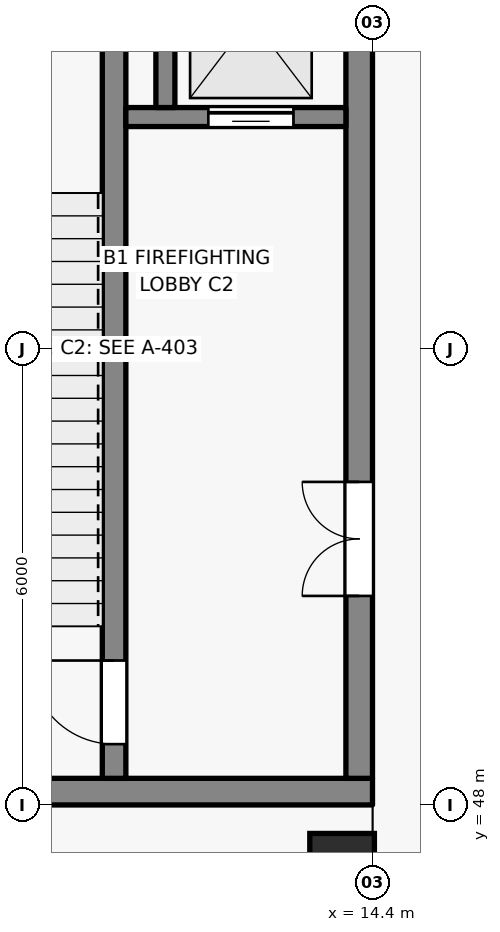
"""IFC4 building model, lengths in metres.
Left out: names, types, materials, properties, quantities, classifications, styles, units other than length and angle.
Written with IfcOpenShell. Run it as: python <this file> out.ifc"""

import sys

from ifc_helpers import new_model, si_unit, direction, frame, frame_2d, origin, origin_2d, place, context, subcontext, project, spatial, rectangle, extrude, element, fill, save


model = new_model("IFC4")
c1 = context("Model", 3, precision=1e-05, world=origin(), true_north=direction((0.0, 1.0)))
c2 = subcontext(c1, "Body", "Model", "MODEL_VIEW")
j1 = project(units=[si_unit("LENGTHUNIT", "METRE"), si_unit("PLANEANGLEUNIT", "RADIAN")], contexts=[c1])
p1 = place(None, origin())
s1 = spatial("IfcSite", under=j1, at=p1, CompositionType="ELEMENT")
p2 = place(p1, origin())
s2 = spatial("IfcBuilding", under=s1, at=p2, CompositionType="ELEMENT")
p3 = place(p2, frame((0.0, 0.0, -7.2)))
s3 = spatial("IfcBuildingStorey", under=s2, at=p3, CompositionType="ELEMENT", Elevation=-7.2)
p4 = place(p3, frame((7.2, 48.175, 0.0), z_axis=(0.0, 0.0, 1.0), x_axis=(1.0, 0.0, 0.0)))
e1 = element("IfcWall", 1, at=p4, inside=s3, PredefinedType="SHEAR", context=c2, shape_type="SweptSolid", body=[
    extrude(rectangle(XDim=7.2, YDim=0.35, at=frame_2d((3.6, 0.0))), origin(), (0.0, 0.0, 1.0), 6.8),
])
p5 = place(p3, frame((14.225, 48.35, 0.0), z_axis=(0.0, 0.0, 1.0), x_axis=(0.0, 1.0, 0.0)))
e2 = element("IfcWall", 2, at=p5, inside=s3, PredefinedType="SHEAR", context=c2, shape_type="SweptSolid", body=[
    extrude(rectangle(XDim=11.3, YDim=0.35, at=frame_2d((5.65, 0.0))), origin(), (0.0, 0.0, 1.0), 6.8),
])
p6 = place(p5, frame((2.4, 0.0, 0.0)))
e3 = element("IfcOpeningElement", 3, at=p6, cuts=e2, PredefinedType="OPENING", context=c2, shape_type="SweptSolid", body=[
    extrude(rectangle(XDim=1.5, YDim=2.15, at=frame_2d((0.75, 1.075))), frame((0.0, 0.185, 0.0), z_axis=(0.0, -1.0, 0.0), x_axis=(1.0, 0.0, 0.0)), (0.0, 0.0, 1.0), 0.37),
])
p7 = place(p3, frame((11.0, 48.35, 0.0), z_axis=(0.0, 0.0, 1.0), x_axis=(0.0, 1.0, 0.0)))
e4 = element("IfcWall", 4, at=p7, inside=s3, PredefinedType="SHEAR", context=c2, shape_type="SweptSolid", body=[
    extrude(rectangle(XDim=11.3, YDim=0.31, at=frame_2d((5.65, 0.0))), origin(), (0.0, 0.0, 1.0), 6.8),
])
p8 = place(p7, frame((0.45, 0.0, 0.0)))
e5 = element("IfcOpeningElement", 5, at=p8, cuts=e4, PredefinedType="OPENING", context=c2, shape_type="SweptSolid", body=[
    extrude(rectangle(XDim=1.1, YDim=2.15, at=frame_2d((0.55, 1.075))), frame((0.0, 0.165, 0.0), z_axis=(0.0, -1.0, 0.0), x_axis=(1.0, 0.0, 0.0)), (0.0, 0.0, 1.0), 0.33),
])
p9 = place(p3, frame((14.0, 47.2, 0.0), z_axis=(0.0, 0.0, 1.0), x_axis=(1.0, 0.0, 0.0)))
e6 = element("IfcColumn", 6, at=p9, inside=s3, PredefinedType="COLUMN", context=c2, shape_type="SweptSolid", body=[
    extrude(rectangle(XDim=0.85, YDim=0.85, at=origin_2d()), origin(), (0.0, 0.0, 1.0), 7.2),
])
p10 = place(p3, frame((11.155, 57.05, 0.0), z_axis=(0.0, 0.0, 1.0), x_axis=(1.0, 0.0, 0.0)))
e7 = element("IfcWall", 7, at=p10, inside=s3, PredefinedType="SHEAR", context=c2, shape_type="SweptSolid", body=[
    extrude(rectangle(XDim=2.895, YDim=0.25, at=frame_2d((1.448, 0.0))), origin(), (0.0, 0.0, 1.0), 6.8),
])
p11 = place(p10, frame((1.085, 0.0, 0.0)))
e8 = element("IfcOpeningElement", 8, at=p11, cuts=e7, PredefinedType="OPENING", context=c2, shape_type="SweptSolid", body=[
    extrude(rectangle(XDim=1.12, YDim=2.15, at=frame_2d((0.56, 1.075))), frame((0.0, 0.135, 0.0), z_axis=(0.0, -1.0, 0.0), x_axis=(1.0, 0.0, 0.0)), (0.0, 0.0, 1.0), 0.27),
])
p12 = place(p3, frame((11.675, 57.175, 0.0), z_axis=(0.0, 0.0, 1.0), x_axis=(0.0, 1.0, 0.0)))
e9 = element("IfcWall", 9, at=p12, inside=s3, PredefinedType="SHEAR", context=c2, shape_type="SweptSolid", body=[
    extrude(rectangle(XDim=2.475, YDim=0.25, at=frame_2d((1.237, 0.0))), origin(), (0.0, 0.0, 1.0), 6.8),
])
p13 = place(p11, origin())
e10 = element("IfcDoor", 10, at=p13, inside=s3, OperationType="SLIDING_TO_LEFT", PredefinedType="DOOR", context=c2, shape_type="SweptSolid", body=[
    extrude(rectangle(XDim=1.12, YDim=2.15, at=frame_2d((0.56, 1.075))), frame((0.0, 0.025, 0.0), z_axis=(0.0, -1.0, 0.0), x_axis=(1.0, 0.0, 0.0)), (0.0, 0.0, 1.0), 0.05),
])
fill(e8, e10)
p14 = place(p6, origin())
e11 = element("IfcDoor", 11, at=p14, inside=s3, OperationType="DOUBLE_DOOR_SINGLE_SWING", PredefinedType="DOOR", context=c2, shape_type="SweptSolid", body=[
    extrude(rectangle(XDim=1.5, YDim=2.15, at=frame_2d((0.75, 1.075))), frame((0.0, 0.025, 0.0), z_axis=(0.0, -1.0, 0.0), x_axis=(1.0, 0.0, 0.0)), (0.0, 0.0, 1.0), 0.05),
])
fill(e3, e11)
p15 = place(p8, origin())
e12 = element("IfcDoor", 12, at=p15, inside=s3, OperationType="SINGLE_SWING_RIGHT", PredefinedType="DOOR", context=c2, shape_type="SweptSolid", body=[
    extrude(rectangle(XDim=1.1, YDim=2.15, at=frame_2d((0.55, 1.075))), frame((0.0, 0.025, 0.0), z_axis=(0.0, -1.0, 0.0), x_axis=(1.0, 0.0, 0.0)), (0.0, 0.0, 1.0), 0.05),
])
fill(e5, e12)
save(model, sys.argv[1])
